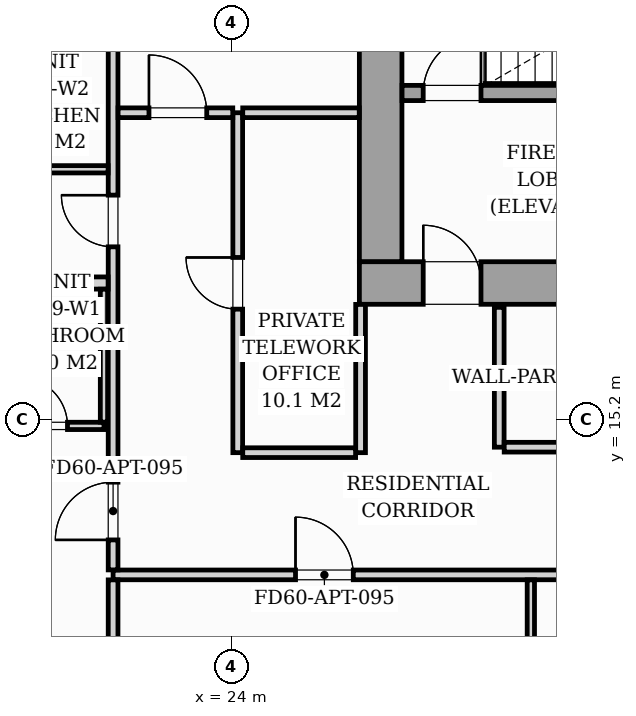
"""IFC4 building model, lengths in metres.
Left out: names, types, materials, properties, quantities, classifications, styles, units other than length and angle.
Written with IfcOpenShell. Run it as: python <this file> out.ifc"""

import sys

from ifc_helpers import new_model, si_unit, direction, frame, frame_2d, origin, origin_2d, place, context, subcontext, project, spatial, rectangle, i_section, extrude, source, transform, mapped, element, fill, save


model = new_model("IFC4")
c1 = context("Model", 3, precision=1e-05, world=origin(), true_north=direction((0.0, 1.0)))
c2 = subcontext(c1, "Body", "Model", "MODEL_VIEW")
j1 = project(units=[si_unit("LENGTHUNIT", "METRE"), si_unit("PLANEANGLEUNIT", "RADIAN")], contexts=[c1])
p1 = place(None, origin())
s1 = spatial("IfcSite", under=j1, at=p1, CompositionType="ELEMENT")
p2 = place(p1, origin())
s2 = spatial("IfcBuilding", under=s1, at=p2, CompositionType="ELEMENT")
p3 = place(p2, frame((0.0, 0.0, 137.4)))
s3 = spatial("IfcBuildingStorey", under=s2, at=p3, CompositionType="ELEMENT", Elevation=137.4)
m1 = source(origin(), c2, "Body", "SweptSolid", [
    extrude(i_section(OverallWidth=0.421, OverallDepth=0.465, WebThickness=0.045, FlangeThickness=0.073, FilletRadius=0.018, at=origin_2d()), origin(), (0.0, 0.0, 1.0), 3.196),
])
p4 = place(p3, frame((26.4, 17.4, 0.002), z_axis=(0.0, 0.0, 1.0), x_axis=(1.0, 0.0, 0.0)))
e1 = element("IfcColumn", 1, at=p4, inside=s3, PredefinedType="PILASTER", context=c2, shape_type="MappedRepresentation", body=[
    mapped(m1, transform((0.0, 0.0, 0.0), scale=1.0)),
])
p5 = place(p3, frame((26.1, 17.45, 0.0), z_axis=(0.0, 0.0, 1.0), x_axis=(1.0, 0.0, 0.0)))
e2 = element("IfcWall", 2, at=p5, inside=s3, PredefinedType="SHEAR", context=c2, shape_type="SweptSolid", body=[
    extrude(rectangle(XDim=19.8, YDim=0.7, at=frame_2d((9.9, 0.0))), origin(), (0.0, 0.0, 1.0), 3.2),
])
p6 = place(p5, frame((1.05, 0.0, 0.0)))
e3 = element("IfcOpeningElement", 3, at=p6, cuts=e2, PredefinedType="OPENING", context=c2, shape_type="SweptSolid", body=[
    extrude(rectangle(XDim=0.95, YDim=2.06, at=frame_2d((0.475, 1.03))), frame((0.0, 0.36, 0.0), z_axis=(0.0, -1.0, 0.0), x_axis=(1.0, 0.0, 0.0)), (0.0, 0.0, 1.0), 0.72),
])
p7 = place(p5, frame((9.48, 0.0, 0.0)))
e4 = element("IfcOpeningElement", 4, at=p7, cuts=e2, PredefinedType="OPENING", context=c2, shape_type="SweptSolid", body=[
    extrude(rectangle(XDim=0.85, YDim=2.0, at=frame_2d((0.425, 1.0))), frame((0.0, 0.36, 0.0), z_axis=(0.0, -1.0, 0.0), x_axis=(1.0, 0.0, 0.0)), (0.0, 0.0, 1.0), 0.72),
])
p8 = place(p5, frame((17.65, 0.0, 0.0)))
e5 = element("IfcOpeningElement", 5, at=p8, cuts=e2, PredefinedType="OPENING", context=c2, shape_type="SweptSolid", body=[
    extrude(rectangle(XDim=0.95, YDim=2.06, at=frame_2d((0.475, 1.03))), frame((0.0, 0.36, 0.0), z_axis=(0.0, -1.0, 0.0), x_axis=(1.0, 0.0, 0.0)), (0.0, 0.0, 1.0), 0.72),
])
p9 = place(p3, frame((26.45, 17.802, 0.0), z_axis=(0.0, 0.0, 1.0), x_axis=(0.0, 1.0, 0.0)))
e6 = element("IfcWall", 6, at=p9, inside=s3, PredefinedType="SHEAR", context=c2, shape_type="SweptSolid", body=[
    extrude(rectangle(XDim=5.796, YDim=0.7, at=frame_2d((2.898, 0.0))), origin(), (0.0, 0.0, 1.0), 3.2),
])
p10 = place(p3, frame((26.802, 20.575, 0.0), z_axis=(0.0, 0.0, 1.0), x_axis=(1.0, 0.0, 0.0)))
e7 = element("IfcWall", 7, at=p10, inside=s3, PredefinedType="SOLIDWALL", context=c2, shape_type="SweptSolid", body=[
    extrude(rectangle(XDim=8.148, YDim=0.25, at=frame_2d((4.074, 0.0))), origin(), (0.0, 0.0, 1.0), 3.2),
])
p11 = place(p10, frame((0.348, 0.0, 0.0)))
e8 = element("IfcOpeningElement", 8, at=p11, cuts=e7, PredefinedType="OPENING", context=c2, shape_type="SweptSolid", body=[
    extrude(rectangle(XDim=0.95, YDim=2.06, at=frame_2d((0.475, 1.03))), frame((0.0, 0.135, 0.0), z_axis=(0.0, -1.0, 0.0), x_axis=(1.0, 0.0, 0.0)), (0.0, 0.0, 1.0), 0.27),
])
p12 = place(p3, frame((28.4, 14.75, 0.0), z_axis=(0.0, 0.0, 1.0), x_axis=(0.0, 1.0, 0.0)))
e9 = element("IfcWall", 9, at=p12, inside=s3, PredefinedType="PARTITIONING", context=c2, shape_type="SweptSolid", body=[
    extrude(rectangle(XDim=2.3, YDim=0.16, at=frame_2d((1.15, 0.0))), origin(), (0.0, 0.0, 1.0), 2.94),
])
p13 = place(p3, frame((28.482, 14.75, 0.0), z_axis=(0.0, 0.0, 1.0), x_axis=(1.0, 0.0, 0.0)))
e10 = element("IfcWall", 10, at=p13, inside=s3, PredefinedType="PARTITIONING", context=c2, shape_type="SweptSolid", body=[
    extrude(rectangle(XDim=4.516, YDim=0.16, at=frame_2d((2.258, 0.0))), origin(), (0.0, 0.0, 1.0), 2.94),
])
p14 = place(p13, frame((1.868, 0.0, 0.0)))
e11 = element("IfcOpeningElement", 11, at=p14, cuts=e10, PredefinedType="OPENING", context=c2, shape_type="SweptSolid", body=[
    extrude(rectangle(XDim=0.8, YDim=2.05, at=frame_2d((0.4, 1.025))), frame((0.0, 0.09, 0.0), z_axis=(0.0, -1.0, 0.0), x_axis=(1.0, 0.0, 0.0)), (0.0, 0.0, 1.0), 0.18),
])
p15 = place(p3, frame((22.05, 12.65, 0.0), z_axis=(0.0, 0.0, 1.0), x_axis=(1.0, 0.0, 0.0)))
e12 = element("IfcWall", 12, at=p15, inside=s3, PredefinedType="PARTITIONING", context=c2, shape_type="SweptSolid", body=[
    extrude(rectangle(XDim=23.83, YDim=0.16, at=frame_2d((11.915, 0.0))), origin(), (0.0, 0.0, 1.0), 2.94),
])
p16 = place(p15, frame((3.0, 0.0, 0.0)))
e13 = element("IfcOpeningElement", 13, at=p16, cuts=e12, PredefinedType="OPENING", context=c2, shape_type="SweptSolid", body=[
    extrude(rectangle(XDim=0.95, YDim=2.06, at=frame_2d((0.475, 1.03))), frame((0.0, 0.09, 0.0), z_axis=(0.0, -1.0, 0.0), x_axis=(1.0, 0.0, 0.0)), (0.0, 0.0, 1.0), 0.18),
])
p17 = place(p15, frame((15.485, 0.0, 0.0)))
e14 = element("IfcOpeningElement", 14, at=p17, cuts=e12, PredefinedType="OPENING", context=c2, shape_type="SweptSolid", body=[
    extrude(rectangle(XDim=0.95, YDim=2.06, at=frame_2d((0.475, 1.03))), frame((0.0, 0.09, 0.0), z_axis=(0.0, -1.0, 0.0), x_axis=(1.0, 0.0, 0.0)), (0.0, 0.0, 1.0), 0.18),
])
p18 = place(p3, frame((22.05, 8.253, 0.0), z_axis=(0.0, 0.0, 1.0), x_axis=(0.0, 1.0, 0.0)))
e15 = element("IfcWall", 15, at=p18, inside=s3, PredefinedType="PARTITIONING", context=c2, shape_type="SweptSolid", body=[
    extrude(rectangle(XDim=4.315, YDim=0.16, at=frame_2d((2.157, 0.0))), origin(), (0.0, 0.0, 1.0), 2.94),
])
p19 = place(p3, frame((22.05, 12.732, 0.0), z_axis=(0.0, 0.0, 1.0), x_axis=(0.0, 1.0, 0.0)))
e16 = element("IfcWall", 16, at=p19, inside=s3, PredefinedType="PARTITIONING", context=c2, shape_type="SweptSolid", body=[
    extrude(rectangle(XDim=14.685, YDim=0.16, at=frame_2d((7.343, 0.0))), origin(), (0.0, 0.0, 1.0), 2.94),
])
p20 = place(p19, frame((0.493, 0.0, 0.0)))
e17 = element("IfcOpeningElement", 17, at=p20, cuts=e16, PredefinedType="OPENING", context=c2, shape_type="SweptSolid", body=[
    extrude(rectangle(XDim=0.95, YDim=2.06, at=frame_2d((0.475, 1.03))), frame((0.0, 0.09, 0.0), z_axis=(0.0, -1.0, 0.0), x_axis=(1.0, 0.0, 0.0)), (0.0, 0.0, 1.0), 0.18),
])
p21 = place(p19, frame((5.313, 0.0, 0.0)))
e18 = element("IfcOpeningElement", 18, at=p21, cuts=e16, PredefinedType="OPENING", context=c2, shape_type="SweptSolid", body=[
    extrude(rectangle(XDim=0.85, YDim=2.0, at=frame_2d((0.425, 1.0))), frame((0.0, 0.09, 0.0), z_axis=(0.0, -1.0, 0.0), x_axis=(1.0, 0.0, 0.0)), (0.0, 0.0, 1.0), 0.18),
])
p22 = place(p3, frame((28.92, 10.462, 0.0), z_axis=(0.0, 0.0, 1.0), x_axis=(0.0, 1.0, 0.0)))
e19 = element("IfcWall", 19, at=p22, inside=s3, PredefinedType="PARTITIONING", context=c2, shape_type="SweptSolid", body=[
    extrude(rectangle(XDim=2.106, YDim=0.12, at=frame_2d((1.053, 0.0))), origin(), (0.0, 0.0, 1.0), 2.94),
])
p23 = place(p3, frame((6.019, 17.45, 0.0), z_axis=(0.0, 0.0, 1.0), x_axis=(1.0, 0.0, 0.0)))
e20 = element("IfcWall", 20, at=p23, inside=s3, PredefinedType="PARTITIONING", context=c2, shape_type="SweptSolid", body=[
    extrude(rectangle(XDim=15.949, YDim=0.2, at=frame_2d((7.975, 0.0))), origin(), (0.0, 0.0, 1.0), 2.94),
])
p24 = place(p3, frame((17.7, 15.1, 0.0), z_axis=(0.0, 0.0, 1.0), x_axis=(1.0, 0.0, 0.0)))
e21 = element("IfcWall", 21, at=p24, inside=s3, PredefinedType="PARTITIONING", context=c2, shape_type="SweptSolid", body=[
    extrude(rectangle(XDim=4.2, YDim=0.12, at=frame_2d((2.1, 0.0))), origin(), (0.0, 0.0, 1.0), 2.94),
])
p25 = place(p24, frame((0.675, 0.0, 0.0)))
e22 = element("IfcOpeningElement", 22, at=p25, cuts=e21, PredefinedType="OPENING", context=c2, shape_type="SweptSolid", body=[
    extrude(rectangle(XDim=0.85, YDim=2.05, at=frame_2d((0.425, 1.025))), frame((0.0, 0.07, 0.0), z_axis=(0.0, -1.0, 0.0), x_axis=(1.0, 0.0, 0.0)), (0.0, 0.0, 1.0), 0.14),
])
p26 = place(p24, frame((2.8, 0.0, 0.0)))
e23 = element("IfcOpeningElement", 23, at=p26, cuts=e21, PredefinedType="OPENING", context=c2, shape_type="SweptSolid", body=[
    extrude(rectangle(XDim=0.8, YDim=2.02, at=frame_2d((0.4, 1.01))), frame((0.0, 0.07, 0.0), z_axis=(0.0, -1.0, 0.0), x_axis=(1.0, 0.0, 0.0)), (0.0, 0.0, 1.0), 0.14),
])
p27 = place(p3, frame((21.9, 15.162, 0.0), z_axis=(0.0, 0.0, 1.0), x_axis=(0.0, 1.0, 0.0)))
e24 = element("IfcWall", 24, at=p27, inside=s3, PredefinedType="PARTITIONING", context=c2, shape_type="SweptSolid", body=[
    extrude(rectangle(XDim=2.186, YDim=0.12, at=frame_2d((1.093, 0.0))), origin(), (0.0, 0.0, 1.0), 2.94),
])
p28 = place(p3, frame((19.712, 19.32, 0.0), z_axis=(0.0, 0.0, 1.0), x_axis=(1.0, 0.0, 0.0)))
e25 = element("IfcWall", 25, at=p28, inside=s3, PredefinedType="PARTITIONING", context=c2, shape_type="SweptSolid", body=[
    extrude(rectangle(XDim=2.256, YDim=0.12, at=frame_2d((1.128, 0.0))), origin(), (0.0, 0.0, 1.0), 2.94),
])
p29 = place(p3, frame((24.1, 14.66, 0.0), z_axis=(0.0, 0.0, 1.0), x_axis=(0.0, 1.0, 0.0)))
e26 = element("IfcWall", 26, at=p29, inside=s3, PredefinedType="PARTITIONING", context=c2, shape_type="SweptSolid", body=[
    extrude(rectangle(XDim=5.59, YDim=0.16, at=frame_2d((2.795, 0.0))), origin(), (0.0, 0.0, 1.0), 2.94),
])
p30 = place(p29, frame((2.36, 0.0, 0.0)))
e27 = element("IfcOpeningElement", 27, at=p30, cuts=e26, PredefinedType="OPENING", context=c2, shape_type="SweptSolid", body=[
    extrude(rectangle(XDim=0.85, YDim=2.0, at=frame_2d((0.425, 1.0))), frame((0.0, 0.09, 0.0), z_axis=(0.0, -1.0, 0.0), x_axis=(1.0, 0.0, 0.0)), (0.0, 0.0, 1.0), 0.18),
])
p31 = place(p3, frame((22.132, 20.25, 0.0), z_axis=(0.0, 0.0, 1.0), x_axis=(1.0, 0.0, 0.0)))
e28 = element("IfcWall", 28, at=p31, inside=s3, PredefinedType="PARTITIONING", context=c2, shape_type="SweptSolid", body=[
    extrude(rectangle(XDim=1.886, YDim=0.16, at=frame_2d((0.943, 0.0))), origin(), (0.0, 0.0, 1.0), 2.94),
])
p32 = place(p31, frame((0.508, 0.0, 0.0)))
e29 = element("IfcOpeningElement", 29, at=p32, cuts=e28, PredefinedType="OPENING", context=c2, shape_type="SweptSolid", body=[
    extrude(rectangle(XDim=0.95, YDim=2.06, at=frame_2d((0.475, 1.03))), frame((0.0, 0.09, 0.0), z_axis=(0.0, -1.0, 0.0), x_axis=(1.0, 0.0, 0.0)), (0.0, 0.0, 1.0), 0.18),
])
p33 = place(p3, frame((24.182, 20.25, 0.0), z_axis=(0.0, 0.0, 1.0), x_axis=(1.0, 0.0, 0.0)))
e30 = element("IfcWall", 30, at=p33, inside=s3, PredefinedType="PARTITIONING", context=c2, shape_type="SweptSolid", body=[
    extrude(rectangle(XDim=1.916, YDim=0.16, at=frame_2d((0.958, 0.0))), origin(), (0.0, 0.0, 1.0), 2.94),
])
p34 = place(p3, frame((26.12, 14.66, 0.0), z_axis=(0.0, 0.0, 1.0), x_axis=(0.0, 1.0, 0.0)))
e31 = element("IfcWall", 31, at=p34, inside=s3, PredefinedType="PARTITIONING", context=c2, shape_type="SweptSolid", body=[
    extrude(rectangle(XDim=2.438, YDim=0.16, at=frame_2d((1.219, 0.0))), origin(), (0.0, 0.0, 1.0), 2.94),
])
p35 = place(p3, frame((24.182, 14.66, 0.0), z_axis=(0.0, 0.0, 1.0), x_axis=(1.0, 0.0, 0.0)))
e32 = element("IfcWall", 32, at=p35, inside=s3, PredefinedType="PARTITIONING", context=c2, shape_type="SweptSolid", body=[
    extrude(rectangle(XDim=1.856, YDim=0.16, at=frame_2d((0.928, 0.0))), origin(), (0.0, 0.0, 1.0), 2.94),
])
m2 = source(origin(), c2, "Body", "SweptSolid", [
    extrude(rectangle(XDim=0.95, YDim=2.06, at=frame_2d((0.475, 1.03))), frame((0.0, 0.025, 0.0), z_axis=(0.0, -1.0, 0.0), x_axis=(1.0, 0.0, 0.0)), (0.0, 0.0, 1.0), 0.05),
])
p36 = place(p6, origin())
e33 = element("IfcDoor", 33, at=p36, inside=s3, OperationType="SINGLE_SWING_LEFT", PredefinedType="DOOR", context=c2, shape_type="MappedRepresentation", body=[
    mapped(m2, transform((0.0, 0.0, 0.0), scale=1.0)),
])
fill(e3, e33)
p37 = place(p11, origin())
e34 = element("IfcDoor", 34, at=p37, inside=s3, OperationType="SINGLE_SWING_RIGHT", PredefinedType="DOOR", context=c2, shape_type="MappedRepresentation", body=[
    mapped(m2, transform((0.0, 0.0, 0.0), scale=1.0)),
])
fill(e8, e34)
m3 = source(origin(), c2, "Body", "SweptSolid", [
    extrude(rectangle(XDim=0.95, YDim=2.06, at=frame_2d((0.475, 1.03))), frame((0.0, 0.025, 0.0), z_axis=(0.0, -1.0, 0.0), x_axis=(1.0, 0.0, 0.0)), (0.0, 0.0, 1.0), 0.05),
])
p38 = place(p16, origin())
e35 = element("IfcDoor", 35, at=p38, inside=s3, OperationType="SINGLE_SWING_LEFT", PredefinedType="DOOR", context=c2, shape_type="MappedRepresentation", body=[
    mapped(m3, transform((0.0, 0.0, 0.0), scale=1.0)),
])
fill(e13, e35)
p39 = place(p20, origin())
e36 = element("IfcDoor", 36, at=p39, inside=s3, OperationType="SINGLE_SWING_LEFT", PredefinedType="DOOR", context=c2, shape_type="MappedRepresentation", body=[
    mapped(m3, transform((0.0, 0.0, 0.0), scale=1.0)),
])
fill(e17, e36)
m4 = source(origin(), c2, "Body", "SweptSolid", [
    extrude(rectangle(XDim=0.8, YDim=2.02, at=frame_2d((0.4, 1.01))), frame((0.0, 0.025, 0.0), z_axis=(0.0, -1.0, 0.0), x_axis=(1.0, 0.0, 0.0)), (0.0, 0.0, 1.0), 0.05),
])
p40 = place(p26, origin())
e37 = element("IfcDoor", 37, at=p40, inside=s3, OperationType="SINGLE_SWING_LEFT", PredefinedType="DOOR", context=c2, shape_type="MappedRepresentation", body=[
    mapped(m4, transform((0.0, 0.0, 0.0), scale=1.0)),
])
fill(e23, e37)
m5 = source(origin(), c2, "Body", "SweptSolid", [
    extrude(rectangle(XDim=0.85, YDim=2.0, at=frame_2d((0.425, 1.0))), frame((0.0, 0.025, 0.0), z_axis=(0.0, -1.0, 0.0), x_axis=(1.0, 0.0, 0.0)), (0.0, 0.0, 1.0), 0.05),
])
p41 = place(p21, origin())
e38 = element("IfcDoor", 38, at=p41, inside=s3, OperationType="SINGLE_SWING_RIGHT", PredefinedType="DOOR", context=c2, shape_type="MappedRepresentation", body=[
    mapped(m5, transform((0.0, 0.0, 0.0), scale=1.0)),
])
fill(e18, e38)
p42 = place(p30, origin())
e39 = element("IfcDoor", 39, at=p42, inside=s3, OperationType="SINGLE_SWING_RIGHT", PredefinedType="DOOR", context=c2, shape_type="MappedRepresentation", body=[
    mapped(m5, transform((0.0, 0.0, 0.0), scale=1.0)),
])
fill(e27, e39)
p43 = place(p32, origin())
e40 = element("IfcDoor", 40, at=p43, inside=s3, OperationType="SINGLE_SWING_LEFT", PredefinedType="DOOR", context=c2, shape_type="MappedRepresentation", body=[
    mapped(m3, transform((0.0, 0.0, 0.0), scale=1.0)),
])
fill(e29, e40)
save(model, sys.argv[1])
